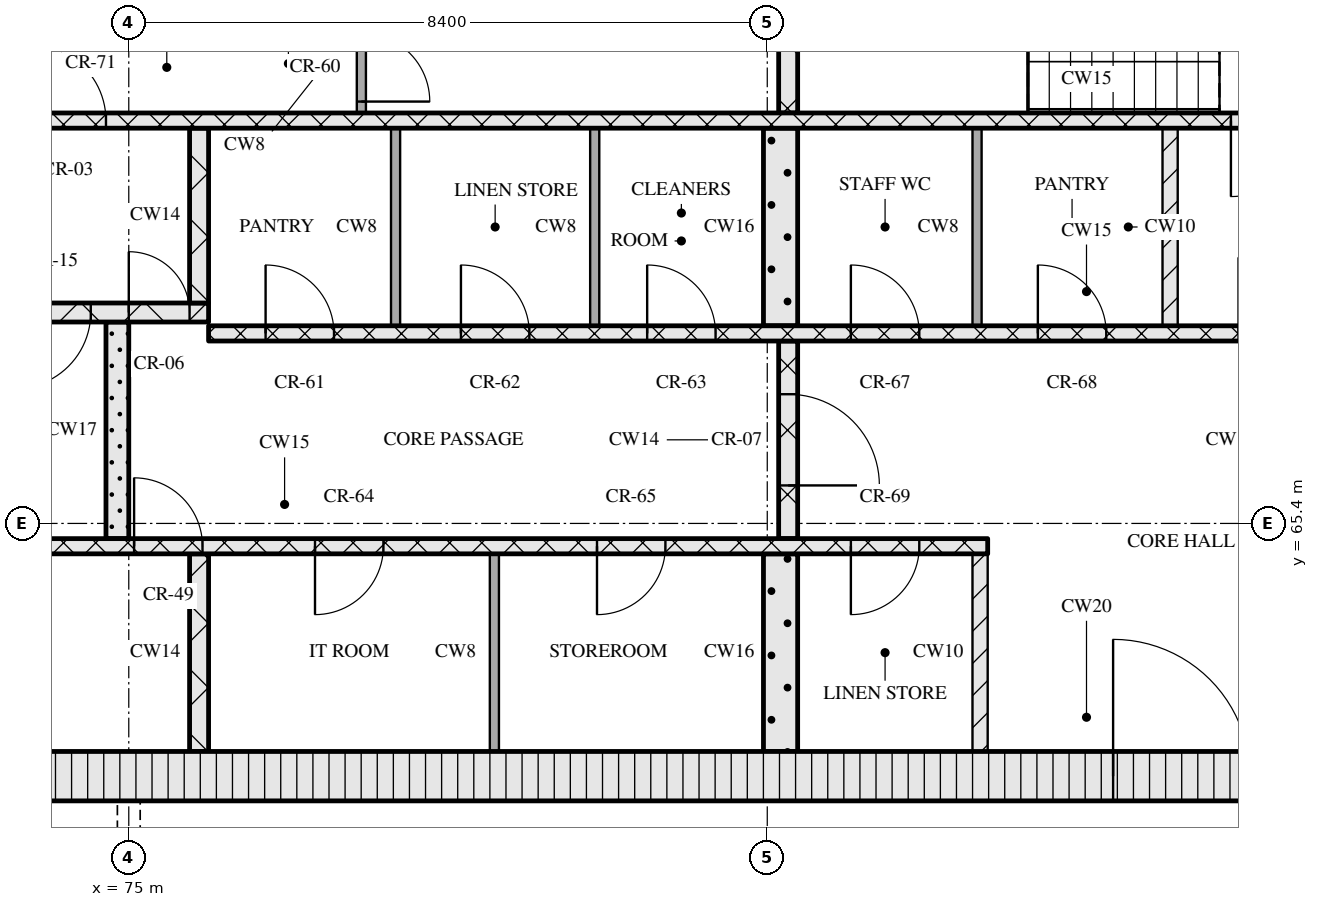
"""IFC4 building model, lengths in metres.
Left out: names, types, materials, properties, quantities, classifications, styles, units other than length and angle.
Written with IfcOpenShell. Run it as: python <this file> out.ifc"""

import sys

from ifc_helpers import new_model, si_unit, direction, frame, frame_2d, origin, place, context, subcontext, project, spatial, rectangle, extrude, element, fill, save


model = new_model("IFC4")
c1 = context("Model", 3, precision=1e-05, world=origin(), true_north=direction((0.0, 1.0)))
c2 = subcontext(c1, "Body", "Model", "MODEL_VIEW")
j1 = project(units=[si_unit("LENGTHUNIT", "METRE"), si_unit("PLANEANGLEUNIT", "RADIAN")], contexts=[c1])
p1 = place(None, origin())
s1 = spatial("IfcSite", under=j1, at=p1, CompositionType="ELEMENT")
p2 = place(p1, origin())
s2 = spatial("IfcBuilding", under=s1, at=p2, CompositionType="ELEMENT")
p3 = place(p2, frame((0.0, 0.0, 245.1)))
s3 = spatial("IfcBuildingStorey", under=s2, at=p3, CompositionType="ELEMENT", Elevation=245.1)
p4 = place(p3, frame((67.15, 62.075, 0.0), z_axis=(0.0, 0.0, 1.0), x_axis=(1.0, 0.0, 0.0)))
e1 = element("IfcWall", 1, at=p4, inside=s3, PredefinedType="SOLIDWALL", context=c2, shape_type="SweptSolid", body=[
    extrude(rectangle(XDim=40.9, YDim=0.65, at=frame_2d((20.45, 0.0))), origin(), (0.0, 0.0, 1.0), 3.32),
])
p5 = place(p4, frame((20.8, 0.0, 0.0)))
e2 = element("IfcOpeningElement", 2, at=p5, cuts=e1, PredefinedType="OPENING", context=c2, shape_type="SweptSolid", body=[
    extrude(rectangle(XDim=1.8, YDim=2.1, at=frame_2d((0.9, 1.05))), frame((0.0, 0.335, 0.0), z_axis=(0.0, -1.0, 0.0), x_axis=(1.0, 0.0, 0.0)), (0.0, 0.0, 1.0), 0.67),
])
p6 = place(p3, frame((75.925, 62.4, 0.0), z_axis=(0.0, 0.0, 1.0), x_axis=(0.0, 1.0, 0.0)))
e3 = element("IfcWall", 3, at=p6, inside=s3, PredefinedType="SOLIDWALL", context=c2, shape_type="SweptSolid", body=[
    extrude(rectangle(XDim=2.6, YDim=0.25, at=frame_2d((1.3, 0.0))), origin(), (0.0, 0.0, 1.0), 3.32),
])
p7 = place(p3, frame((79.81, 62.4, 0.0), z_axis=(0.0, 0.0, 1.0), x_axis=(0.0, 1.0, 0.0)))
e4 = element("IfcWall", 4, at=p7, inside=s3, PredefinedType="PARTITIONING", context=c2, shape_type="SweptSolid", body=[
    extrude(rectangle(XDim=2.6, YDim=0.12, at=frame_2d((1.3, 0.0))), origin(), (0.0, 0.0, 1.0), 3.32),
])
p8 = place(p3, frame((83.575, 62.4, 0.0), z_axis=(0.0, 0.0, 1.0), x_axis=(0.0, 1.0, 0.0)))
e5 = element("IfcWall", 5, at=p8, inside=s3, PredefinedType="SOLIDWALL", context=c2, shape_type="SweptSolid", body=[
    extrude(rectangle(XDim=2.6, YDim=0.45, at=frame_2d((1.3, 0.0))), origin(), (0.0, 0.0, 1.0), 3.32),
])
p9 = place(p3, frame((86.2, 62.4, 0.0), z_axis=(0.0, 0.0, 1.0), x_axis=(0.0, 1.0, 0.0)))
e6 = element("IfcWall", 6, at=p9, inside=s3, PredefinedType="PARTITIONING", context=c2, shape_type="SweptSolid", body=[
    extrude(rectangle(XDim=2.6, YDim=0.2, at=frame_2d((1.3, 0.0))), origin(), (0.0, 0.0, 1.0), 3.32),
])
p10 = place(p3, frame((67.8, 65.1, 0.0), z_axis=(0.0, 0.0, 1.0), x_axis=(1.0, 0.0, 0.0)))
e7 = element("IfcWall", 7, at=p10, inside=s3, PredefinedType="SOLIDWALL", context=c2, shape_type="SweptSolid", body=[
    extrude(rectangle(XDim=18.5, YDim=0.2, at=frame_2d((9.25, 0.0))), origin(), (0.0, 0.0, 1.0), 3.32),
])
p11 = place(p10, frame((7.27, 0.0, 0.0)))
e8 = element("IfcOpeningElement", 8, at=p11, cuts=e7, PredefinedType="OPENING", context=c2, shape_type="SweptSolid", body=[
    extrude(rectangle(XDim=0.9, YDim=2.1, at=frame_2d((0.45, 1.05))), frame((0.0, 0.11, 0.0), z_axis=(0.0, -1.0, 0.0), x_axis=(1.0, 0.0, 0.0)), (0.0, 0.0, 1.0), 0.22),
])
p12 = place(p10, frame((9.65, 0.0, 0.0)))
e9 = element("IfcOpeningElement", 9, at=p12, cuts=e7, PredefinedType="OPENING", context=c2, shape_type="SweptSolid", body=[
    extrude(rectangle(XDim=0.9, YDim=2.1, at=frame_2d((0.45, 1.05))), frame((0.0, 0.11, 0.0), z_axis=(0.0, -1.0, 0.0), x_axis=(1.0, 0.0, 0.0)), (0.0, 0.0, 1.0), 0.22),
])
p13 = place(p10, frame((13.36, 0.0, 0.0)))
e10 = element("IfcOpeningElement", 10, at=p13, cuts=e7, PredefinedType="OPENING", context=c2, shape_type="SweptSolid", body=[
    extrude(rectangle(XDim=0.9, YDim=2.1, at=frame_2d((0.45, 1.05))), frame((0.0, 0.11, 0.0), z_axis=(0.0, -1.0, 0.0), x_axis=(1.0, 0.0, 0.0)), (0.0, 0.0, 1.0), 0.22),
])
p14 = place(p10, frame((16.7, 0.0, 0.0)))
e11 = element("IfcOpeningElement", 11, at=p14, cuts=e7, PredefinedType="OPENING", context=c2, shape_type="SweptSolid", body=[
    extrude(rectangle(XDim=0.9, YDim=2.1, at=frame_2d((0.45, 1.05))), frame((0.0, 0.11, 0.0), z_axis=(0.0, -1.0, 0.0), x_axis=(1.0, 0.0, 0.0)), (0.0, 0.0, 1.0), 0.22),
])
p15 = place(p3, frame((74.85, 65.2, 0.0), z_axis=(0.0, 0.0, 1.0), x_axis=(0.0, 1.0, 0.0)))
e12 = element("IfcWall", 12, at=p15, inside=s3, PredefinedType="SOLIDWALL", context=c2, shape_type="SweptSolid", body=[
    extrude(rectangle(XDim=2.85, YDim=0.3, at=frame_2d((1.425, 0.0))), origin(), (0.0, 0.0, 1.0), 3.32),
])
p16 = place(p3, frame((83.675, 65.2, 0.0), z_axis=(0.0, 0.0, 1.0), x_axis=(0.0, 1.0, 0.0)))
e13 = element("IfcWall", 13, at=p16, inside=s3, PredefinedType="SOLIDWALL", context=c2, shape_type="SweptSolid", body=[
    extrude(rectangle(XDim=2.6, YDim=0.25, at=frame_2d((1.3, 0.0))), origin(), (0.0, 0.0, 1.0), 3.32),
])
p17 = place(p16, frame((0.7, 0.0, 0.0)))
e14 = element("IfcOpeningElement", 14, at=p17, cuts=e13, PredefinedType="OPENING", context=c2, shape_type="SweptSolid", body=[
    extrude(rectangle(XDim=1.2, YDim=2.1, at=frame_2d((0.6, 1.05))), frame((0.0, 0.135, 0.0), z_axis=(0.0, -1.0, 0.0), x_axis=(1.0, 0.0, 0.0)), (0.0, 0.0, 1.0), 0.27),
])
p18 = place(p3, frame((76.05, 67.9, 0.0), z_axis=(0.0, 0.0, 1.0), x_axis=(1.0, 0.0, 0.0)))
e15 = element("IfcWall", 15, at=p18, inside=s3, PredefinedType="SOLIDWALL", context=c2, shape_type="SweptSolid", body=[
    extrude(rectangle(XDim=23.1, YDim=0.2, at=frame_2d((11.55, 0.0))), origin(), (0.0, 0.0, 1.0), 3.32),
])
p19 = place(p18, frame((0.75, 0.0, 0.0)))
e16 = element("IfcOpeningElement", 16, at=p19, cuts=e15, PredefinedType="OPENING", context=c2, shape_type="SweptSolid", body=[
    extrude(rectangle(XDim=0.9, YDim=2.1, at=frame_2d((0.45, 1.05))), frame((0.0, 0.11, 0.0), z_axis=(0.0, -1.0, 0.0), x_axis=(1.0, 0.0, 0.0)), (0.0, 0.0, 1.0), 0.22),
])
p20 = place(p18, frame((3.32, 0.0, 0.0)))
e17 = element("IfcOpeningElement", 17, at=p20, cuts=e15, PredefinedType="OPENING", context=c2, shape_type="SweptSolid", body=[
    extrude(rectangle(XDim=0.9, YDim=2.1, at=frame_2d((0.45, 1.05))), frame((0.0, 0.11, 0.0), z_axis=(0.0, -1.0, 0.0), x_axis=(1.0, 0.0, 0.0)), (0.0, 0.0, 1.0), 0.22),
])
p21 = place(p18, frame((5.77, 0.0, 0.0)))
e18 = element("IfcOpeningElement", 18, at=p21, cuts=e15, PredefinedType="OPENING", context=c2, shape_type="SweptSolid", body=[
    extrude(rectangle(XDim=0.9, YDim=2.1, at=frame_2d((0.45, 1.05))), frame((0.0, 0.11, 0.0), z_axis=(0.0, -1.0, 0.0), x_axis=(1.0, 0.0, 0.0)), (0.0, 0.0, 1.0), 0.22),
])
p22 = place(p18, frame((8.45, 0.0, 0.0)))
e19 = element("IfcOpeningElement", 19, at=p22, cuts=e15, PredefinedType="OPENING", context=c2, shape_type="SweptSolid", body=[
    extrude(rectangle(XDim=0.9, YDim=2.1, at=frame_2d((0.45, 1.05))), frame((0.0, 0.11, 0.0), z_axis=(0.0, -1.0, 0.0), x_axis=(1.0, 0.0, 0.0)), (0.0, 0.0, 1.0), 0.22),
])
p23 = place(p18, frame((10.91, 0.0, 0.0)))
e20 = element("IfcOpeningElement", 20, at=p23, cuts=e15, PredefinedType="OPENING", context=c2, shape_type="SweptSolid", body=[
    extrude(rectangle(XDim=0.9, YDim=2.1, at=frame_2d((0.45, 1.05))), frame((0.0, 0.11, 0.0), z_axis=(0.0, -1.0, 0.0), x_axis=(1.0, 0.0, 0.0)), (0.0, 0.0, 1.0), 0.22),
])
p24 = place(p18, frame((13.55, 0.0, 0.0)))
e21 = element("IfcOpeningElement", 21, at=p24, cuts=e15, PredefinedType="OPENING", context=c2, shape_type="SweptSolid", body=[
    extrude(rectangle(XDim=1.0, YDim=2.1, at=frame_2d((0.5, 1.05))), frame((0.0, 0.11, 0.0), z_axis=(0.0, -1.0, 0.0), x_axis=(1.0, 0.0, 0.0)), (0.0, 0.0, 1.0), 0.22),
])
p25 = place(p18, frame((16.2, 0.0, 0.0)))
e22 = element("IfcOpeningElement", 22, at=p25, cuts=e15, PredefinedType="OPENING", context=c2, shape_type="SweptSolid", body=[
    extrude(rectangle(XDim=1.1, YDim=2.1, at=frame_2d((0.55, 1.05))), frame((0.0, 0.11, 0.0), z_axis=(0.0, -1.0, 0.0), x_axis=(1.0, 0.0, 0.0)), (0.0, 0.0, 1.0), 0.22),
])
p26 = place(p18, frame((18.7, 0.0, 0.0)))
e23 = element("IfcOpeningElement", 23, at=p26, cuts=e15, PredefinedType="OPENING", context=c2, shape_type="SweptSolid", body=[
    extrude(rectangle(XDim=1.1, YDim=2.1, at=frame_2d((0.55, 1.05))), frame((0.0, 0.11, 0.0), z_axis=(0.0, -1.0, 0.0), x_axis=(1.0, 0.0, 0.0)), (0.0, 0.0, 1.0), 0.22),
])
p27 = place(p18, frame((21.2, 0.0, 0.0)))
e24 = element("IfcOpeningElement", 24, at=p27, cuts=e15, PredefinedType="OPENING", context=c2, shape_type="SweptSolid", body=[
    extrude(rectangle(XDim=1.1, YDim=2.1, at=frame_2d((0.55, 1.05))), frame((0.0, 0.11, 0.0), z_axis=(0.0, -1.0, 0.0), x_axis=(1.0, 0.0, 0.0)), (0.0, 0.0, 1.0), 0.22),
])
for number, where, z_axis, x_axis in (
    (25, (78.51, 68.0, 0.0), (0.0, 0.0, 1.0), (0.0, 1.0, 0.0)),
    (26, (81.13, 68.0, 0.0), (0.0, 0.0, 1.0), (0.0, 1.0, 0.0)),
):
    element("IfcWall", number, at=place(p3, frame(where, z_axis=z_axis, x_axis=x_axis)), inside=s3, PredefinedType="PARTITIONING", context=c2, shape_type="SweptSolid", body=[
        extrude(rectangle(XDim=2.6, YDim=0.12, at=frame_2d((1.3, 0.0))), origin(), (0.0, 0.0, 1.0), 3.32),
    ])
p28 = place(p3, frame((83.575, 68.0, 0.0), z_axis=(0.0, 0.0, 1.0), x_axis=(0.0, 1.0, 0.0)))
e27 = element("IfcWall", 27, at=p28, inside=s3, PredefinedType="SOLIDWALL", context=c2, shape_type="SweptSolid", body=[
    extrude(rectangle(XDim=2.6, YDim=0.45, at=frame_2d((1.3, 0.0))), origin(), (0.0, 0.0, 1.0), 3.32),
])
p29 = place(p3, frame((86.16, 68.0, 0.0), z_axis=(0.0, 0.0, 1.0), x_axis=(0.0, 1.0, 0.0)))
e28 = element("IfcWall", 28, at=p29, inside=s3, PredefinedType="PARTITIONING", context=c2, shape_type="SweptSolid", body=[
    extrude(rectangle(XDim=2.6, YDim=0.12, at=frame_2d((1.3, 0.0))), origin(), (0.0, 0.0, 1.0), 3.32),
])
p30 = place(p3, frame((88.7, 68.0, 0.0), z_axis=(0.0, 0.0, 1.0), x_axis=(0.0, 1.0, 0.0)))
e29 = element("IfcWall", 29, at=p30, inside=s3, PredefinedType="PARTITIONING", context=c2, shape_type="SweptSolid", body=[
    extrude(rectangle(XDim=2.6, YDim=0.2, at=frame_2d((1.3, 0.0))), origin(), (0.0, 0.0, 1.0), 3.32),
])
p31 = place(p3, frame((67.8, 68.175, 0.0), z_axis=(0.0, 0.0, 1.0), x_axis=(1.0, 0.0, 0.0)))
e30 = element("IfcWall", 30, at=p31, inside=s3, PredefinedType="SOLIDWALL", context=c2, shape_type="SweptSolid", body=[
    extrude(rectangle(XDim=8.25, YDim=0.25, at=frame_2d((4.125, 0.0))), origin(), (0.0, 0.0, 1.0), 3.32),
])
p32 = place(p31, frame((5.7, 0.0, 0.0)))
e31 = element("IfcOpeningElement", 31, at=p32, cuts=e30, PredefinedType="OPENING", context=c2, shape_type="SweptSolid", body=[
    extrude(rectangle(XDim=1.0, YDim=2.1, at=frame_2d((0.5, 1.05))), frame((0.0, 0.135, 0.0), z_axis=(0.0, -1.0, 0.0), x_axis=(1.0, 0.0, 0.0)), (0.0, 0.0, 1.0), 0.27),
])
p33 = place(p31, frame((7.2, 0.0, 0.0)))
e32 = element("IfcOpeningElement", 32, at=p33, cuts=e30, PredefinedType="OPENING", context=c2, shape_type="SweptSolid", body=[
    extrude(rectangle(XDim=0.8, YDim=2.1, at=frame_2d((0.4, 1.05))), frame((0.0, 0.135, 0.0), z_axis=(0.0, -1.0, 0.0), x_axis=(1.0, 0.0, 0.0)), (0.0, 0.0, 1.0), 0.27),
])
p34 = place(p3, frame((75.925, 68.3, 0.0), z_axis=(0.0, 0.0, 1.0), x_axis=(0.0, 1.0, 0.0)))
e33 = element("IfcWall", 33, at=p34, inside=s3, PredefinedType="SOLIDWALL", context=c2, shape_type="SweptSolid", body=[
    extrude(rectangle(XDim=2.3, YDim=0.25, at=frame_2d((1.15, 0.0))), origin(), (0.0, 0.0, 1.0), 3.32),
])
p35 = place(p3, frame((67.8, 70.7, 0.0), z_axis=(0.0, 0.0, 1.0), x_axis=(1.0, 0.0, 0.0)))
e34 = element("IfcWall", 34, at=p35, inside=s3, PredefinedType="SOLIDWALL", context=c2, shape_type="SweptSolid", body=[
    extrude(rectangle(XDim=39.6, YDim=0.2, at=frame_2d((19.8, 0.0))), origin(), (0.0, 0.0, 1.0), 3.32),
])
p36 = place(p35, frame((0.65, 0.0, 0.0)))
e35 = element("IfcOpeningElement", 35, at=p36, cuts=e34, PredefinedType="OPENING", context=c2, shape_type="SweptSolid", body=[
    extrude(rectangle(XDim=1.1, YDim=2.1, at=frame_2d((0.55, 1.05))), frame((0.0, 0.11, 0.0), z_axis=(0.0, -1.0, 0.0), x_axis=(1.0, 0.0, 0.0)), (0.0, 0.0, 1.0), 0.22),
])
p37 = place(p35, frame((3.25, 0.0, 0.0)))
e36 = element("IfcOpeningElement", 36, at=p37, cuts=e34, PredefinedType="OPENING", context=c2, shape_type="SweptSolid", body=[
    extrude(rectangle(XDim=1.1, YDim=2.1, at=frame_2d((0.55, 1.05))), frame((0.0, 0.11, 0.0), z_axis=(0.0, -1.0, 0.0), x_axis=(1.0, 0.0, 0.0)), (0.0, 0.0, 1.0), 0.22),
])
p38 = place(p35, frame((5.9, 0.0, 0.0)))
e37 = element("IfcOpeningElement", 37, at=p38, cuts=e34, PredefinedType="OPENING", context=c2, shape_type="SweptSolid", body=[
    extrude(rectangle(XDim=1.0, YDim=2.1, at=frame_2d((0.5, 1.05))), frame((0.0, 0.11, 0.0), z_axis=(0.0, -1.0, 0.0), x_axis=(1.0, 0.0, 0.0)), (0.0, 0.0, 1.0), 0.22),
])
p39 = place(p35, frame((21.7, 0.0, 0.0)))
e38 = element("IfcOpeningElement", 38, at=p39, cuts=e34, PredefinedType="OPENING", context=c2, shape_type="SweptSolid", body=[
    extrude(rectangle(XDim=1.0, YDim=2.1, at=frame_2d((0.5, 1.05))), frame((0.0, 0.11, 0.0), z_axis=(0.0, -1.0, 0.0), x_axis=(1.0, 0.0, 0.0)), (0.0, 0.0, 1.0), 0.22),
])
p40 = place(p35, frame((32.7, 0.0, 0.0)))
e39 = element("IfcOpeningElement", 39, at=p40, cuts=e34, PredefinedType="OPENING", context=c2, shape_type="SweptSolid", body=[
    extrude(rectangle(XDim=1.0, YDim=2.1, at=frame_2d((0.5, 1.05))), frame((0.0, 0.11, 0.0), z_axis=(0.0, -1.0, 0.0), x_axis=(1.0, 0.0, 0.0)), (0.0, 0.0, 1.0), 0.22),
])
p41 = place(p35, frame((35.25, 0.0, 0.0)))
e40 = element("IfcOpeningElement", 40, at=p41, cuts=e34, PredefinedType="OPENING", context=c2, shape_type="SweptSolid", body=[
    extrude(rectangle(XDim=1.1, YDim=2.1, at=frame_2d((0.55, 1.05))), frame((0.0, 0.11, 0.0), z_axis=(0.0, -1.0, 0.0), x_axis=(1.0, 0.0, 0.0)), (0.0, 0.0, 1.0), 0.22),
])
p42 = place(p35, frame((37.85, 0.0, 0.0)))
e41 = element("IfcOpeningElement", 41, at=p42, cuts=e34, PredefinedType="OPENING", context=c2, shape_type="SweptSolid", body=[
    extrude(rectangle(XDim=1.1, YDim=2.1, at=frame_2d((0.55, 1.05))), frame((0.0, 0.11, 0.0), z_axis=(0.0, -1.0, 0.0), x_axis=(1.0, 0.0, 0.0)), (0.0, 0.0, 1.0), 0.22),
])
p43 = place(p3, frame((78.06, 70.8, 0.0), z_axis=(0.0, 0.0, 1.0), x_axis=(0.0, 1.0, 0.0)))
e42 = element("IfcWall", 42, at=p43, inside=s3, PredefinedType="PARTITIONING", context=c2, shape_type="SweptSolid", body=[
    extrude(rectangle(XDim=1.2, YDim=0.12, at=frame_2d((0.6, 0.0))), origin(), (0.0, 0.0, 1.0), 3.32),
])
p44 = place(p43, frame((0.15, 0.0, 0.0)))
e43 = element("IfcOpeningElement", 43, at=p44, cuts=e42, PredefinedType="OPENING", context=c2, shape_type="SweptSolid", body=[
    extrude(rectangle(XDim=0.9, YDim=2.1, at=frame_2d((0.45, 1.05))), frame((0.0, 0.07, 0.0), z_axis=(0.0, -1.0, 0.0), x_axis=(1.0, 0.0, 0.0)), (0.0, 0.0, 1.0), 0.14),
])
p45 = place(p3, frame((83.675, 70.8, 0.0), z_axis=(0.0, 0.0, 1.0), x_axis=(0.0, 1.0, 0.0)))
e44 = element("IfcWall", 44, at=p45, inside=s3, PredefinedType="SOLIDWALL", context=c2, shape_type="SweptSolid", body=[
    extrude(rectangle(XDim=2.95, YDim=0.25, at=frame_2d((1.475, 0.0))), origin(), (0.0, 0.0, 1.0), 3.32),
])
p46 = place(p5, origin())
e45 = element("IfcDoor", 45, at=p46, inside=s3, OperationType="DOUBLE_DOOR_SINGLE_SWING", PredefinedType="DOOR", context=c2, shape_type="SweptSolid", body=[
    extrude(rectangle(XDim=1.8, YDim=2.1, at=frame_2d((0.9, 1.05))), frame((0.0, 0.025, 0.0), z_axis=(0.0, -1.0, 0.0), x_axis=(1.0, 0.0, 0.0)), (0.0, 0.0, 1.0), 0.05),
])
fill(e2, e45)
p47 = place(p11, origin())
e46 = element("IfcDoor", 46, at=p47, inside=s3, OperationType="SINGLE_SWING_LEFT", PredefinedType="DOOR", context=c2, shape_type="SweptSolid", body=[
    extrude(rectangle(XDim=0.9, YDim=2.1, at=frame_2d((0.45, 1.05))), frame((0.0, 0.025, 0.0), z_axis=(0.0, -1.0, 0.0), x_axis=(1.0, 0.0, 0.0)), (0.0, 0.0, 1.0), 0.05),
])
fill(e8, e46)
p48 = place(p12, origin())
e47 = element("IfcDoor", 47, at=p48, inside=s3, OperationType="SINGLE_SWING_RIGHT", PredefinedType="DOOR", context=c2, shape_type="SweptSolid", body=[
    extrude(rectangle(XDim=0.9, YDim=2.1, at=frame_2d((0.45, 1.05))), frame((0.0, 0.025, 0.0), z_axis=(0.0, -1.0, 0.0), x_axis=(1.0, 0.0, 0.0)), (0.0, 0.0, 1.0), 0.05),
])
fill(e9, e47)
p49 = place(p13, origin())
e48 = element("IfcDoor", 48, at=p49, inside=s3, OperationType="SINGLE_SWING_RIGHT", PredefinedType="DOOR", context=c2, shape_type="SweptSolid", body=[
    extrude(rectangle(XDim=0.9, YDim=2.1, at=frame_2d((0.45, 1.05))), frame((0.0, 0.025, 0.0), z_axis=(0.0, -1.0, 0.0), x_axis=(1.0, 0.0, 0.0)), (0.0, 0.0, 1.0), 0.05),
])
fill(e10, e48)
p50 = place(p14, origin())
e49 = element("IfcDoor", 49, at=p50, inside=s3, OperationType="SINGLE_SWING_RIGHT", PredefinedType="DOOR", context=c2, shape_type="SweptSolid", body=[
    extrude(rectangle(XDim=0.9, YDim=2.1, at=frame_2d((0.45, 1.05))), frame((0.0, 0.025, 0.0), z_axis=(0.0, -1.0, 0.0), x_axis=(1.0, 0.0, 0.0)), (0.0, 0.0, 1.0), 0.05),
])
fill(e11, e49)
p51 = place(p17, origin())
e50 = element("IfcDoor", 50, at=p51, inside=s3, OperationType="SINGLE_SWING_RIGHT", PredefinedType="DOOR", context=c2, shape_type="SweptSolid", body=[
    extrude(rectangle(XDim=1.2, YDim=2.1, at=frame_2d((0.6, 1.05))), frame((0.0, 0.025, 0.0), z_axis=(0.0, -1.0, 0.0), x_axis=(1.0, 0.0, 0.0)), (0.0, 0.0, 1.0), 0.05),
])
fill(e14, e50)
p52 = place(p19, origin())
e51 = element("IfcDoor", 51, at=p52, inside=s3, OperationType="SINGLE_SWING_LEFT", PredefinedType="DOOR", context=c2, shape_type="SweptSolid", body=[
    extrude(rectangle(XDim=0.9, YDim=2.1, at=frame_2d((0.45, 1.05))), frame((0.0, 0.025, 0.0), z_axis=(0.0, -1.0, 0.0), x_axis=(1.0, 0.0, 0.0)), (0.0, 0.0, 1.0), 0.05),
])
fill(e16, e51)
p53 = place(p20, origin())
e52 = element("IfcDoor", 52, at=p53, inside=s3, OperationType="SINGLE_SWING_LEFT", PredefinedType="DOOR", context=c2, shape_type="SweptSolid", body=[
    extrude(rectangle(XDim=0.9, YDim=2.1, at=frame_2d((0.45, 1.05))), frame((0.0, 0.025, 0.0), z_axis=(0.0, -1.0, 0.0), x_axis=(1.0, 0.0, 0.0)), (0.0, 0.0, 1.0), 0.05),
])
fill(e17, e52)
p54 = place(p21, origin())
e53 = element("IfcDoor", 53, at=p54, inside=s3, OperationType="SINGLE_SWING_LEFT", PredefinedType="DOOR", context=c2, shape_type="SweptSolid", body=[
    extrude(rectangle(XDim=0.9, YDim=2.1, at=frame_2d((0.45, 1.05))), frame((0.0, 0.025, 0.0), z_axis=(0.0, -1.0, 0.0), x_axis=(1.0, 0.0, 0.0)), (0.0, 0.0, 1.0), 0.05),
])
fill(e18, e53)
p55 = place(p22, origin())
e54 = element("IfcDoor", 54, at=p55, inside=s3, OperationType="SINGLE_SWING_LEFT", PredefinedType="DOOR", context=c2, shape_type="SweptSolid", body=[
    extrude(rectangle(XDim=0.9, YDim=2.1, at=frame_2d((0.45, 1.05))), frame((0.0, 0.025, 0.0), z_axis=(0.0, -1.0, 0.0), x_axis=(1.0, 0.0, 0.0)), (0.0, 0.0, 1.0), 0.05),
])
fill(e19, e54)
p56 = place(p23, origin())
e55 = element("IfcDoor", 55, at=p56, inside=s3, OperationType="SINGLE_SWING_LEFT", PredefinedType="DOOR", context=c2, shape_type="SweptSolid", body=[
    extrude(rectangle(XDim=0.9, YDim=2.1, at=frame_2d((0.45, 1.05))), frame((0.0, 0.025, 0.0), z_axis=(0.0, -1.0, 0.0), x_axis=(1.0, 0.0, 0.0)), (0.0, 0.0, 1.0), 0.05),
])
fill(e20, e55)
p57 = place(p32, origin())
e56 = element("IfcDoor", 56, at=p57, inside=s3, OperationType="SINGLE_SWING_RIGHT", PredefinedType="DOOR", context=c2, shape_type="SweptSolid", body=[
    extrude(rectangle(XDim=1.0, YDim=2.1, at=frame_2d((0.5, 1.05))), frame((0.0, 0.025, 0.0), z_axis=(0.0, -1.0, 0.0), x_axis=(1.0, 0.0, 0.0)), (0.0, 0.0, 1.0), 0.05),
])
fill(e31, e56)
p58 = place(p33, origin())
e57 = element("IfcDoor", 57, at=p58, inside=s3, OperationType="SINGLE_SWING_LEFT", PredefinedType="DOOR", context=c2, shape_type="SweptSolid", body=[
    extrude(rectangle(XDim=0.8, YDim=2.1, at=frame_2d((0.4, 1.05))), frame((0.0, 0.025, 0.0), z_axis=(0.0, -1.0, 0.0), x_axis=(1.0, 0.0, 0.0)), (0.0, 0.0, 1.0), 0.05),
])
fill(e32, e57)
p59 = place(p38, origin())
e58 = element("IfcDoor", 58, at=p59, inside=s3, OperationType="SINGLE_SWING_LEFT", PredefinedType="DOOR", context=c2, shape_type="SweptSolid", body=[
    extrude(rectangle(XDim=1.0, YDim=2.1, at=frame_2d((0.5, 1.05))), frame((0.0, 0.025, 0.0), z_axis=(0.0, -1.0, 0.0), x_axis=(1.0, 0.0, 0.0)), (0.0, 0.0, 1.0), 0.05),
])
fill(e37, e58)
p60 = place(p39, origin())
e59 = element("IfcDoor", 59, at=p60, inside=s3, OperationType="SINGLE_SWING_RIGHT", PredefinedType="DOOR", context=c2, shape_type="SweptSolid", body=[
    extrude(rectangle(XDim=1.0, YDim=2.1, at=frame_2d((0.5, 1.05))), frame((0.0, 0.025, 0.0), z_axis=(0.0, -1.0, 0.0), x_axis=(1.0, 0.0, 0.0)), (0.0, 0.0, 1.0), 0.05),
])
fill(e38, e59)
p61 = place(p44, origin())
e60 = element("IfcDoor", 60, at=p61, inside=s3, OperationType="SINGLE_SWING_RIGHT", PredefinedType="DOOR", context=c2, shape_type="SweptSolid", body=[
    extrude(rectangle(XDim=0.9, YDim=2.1, at=frame_2d((0.45, 1.05))), frame((0.0, 0.025, 0.0), z_axis=(0.0, -1.0, 0.0), x_axis=(1.0, 0.0, 0.0)), (0.0, 0.0, 1.0), 0.05),
])
fill(e43, e60)
save(model, sys.argv[1])
